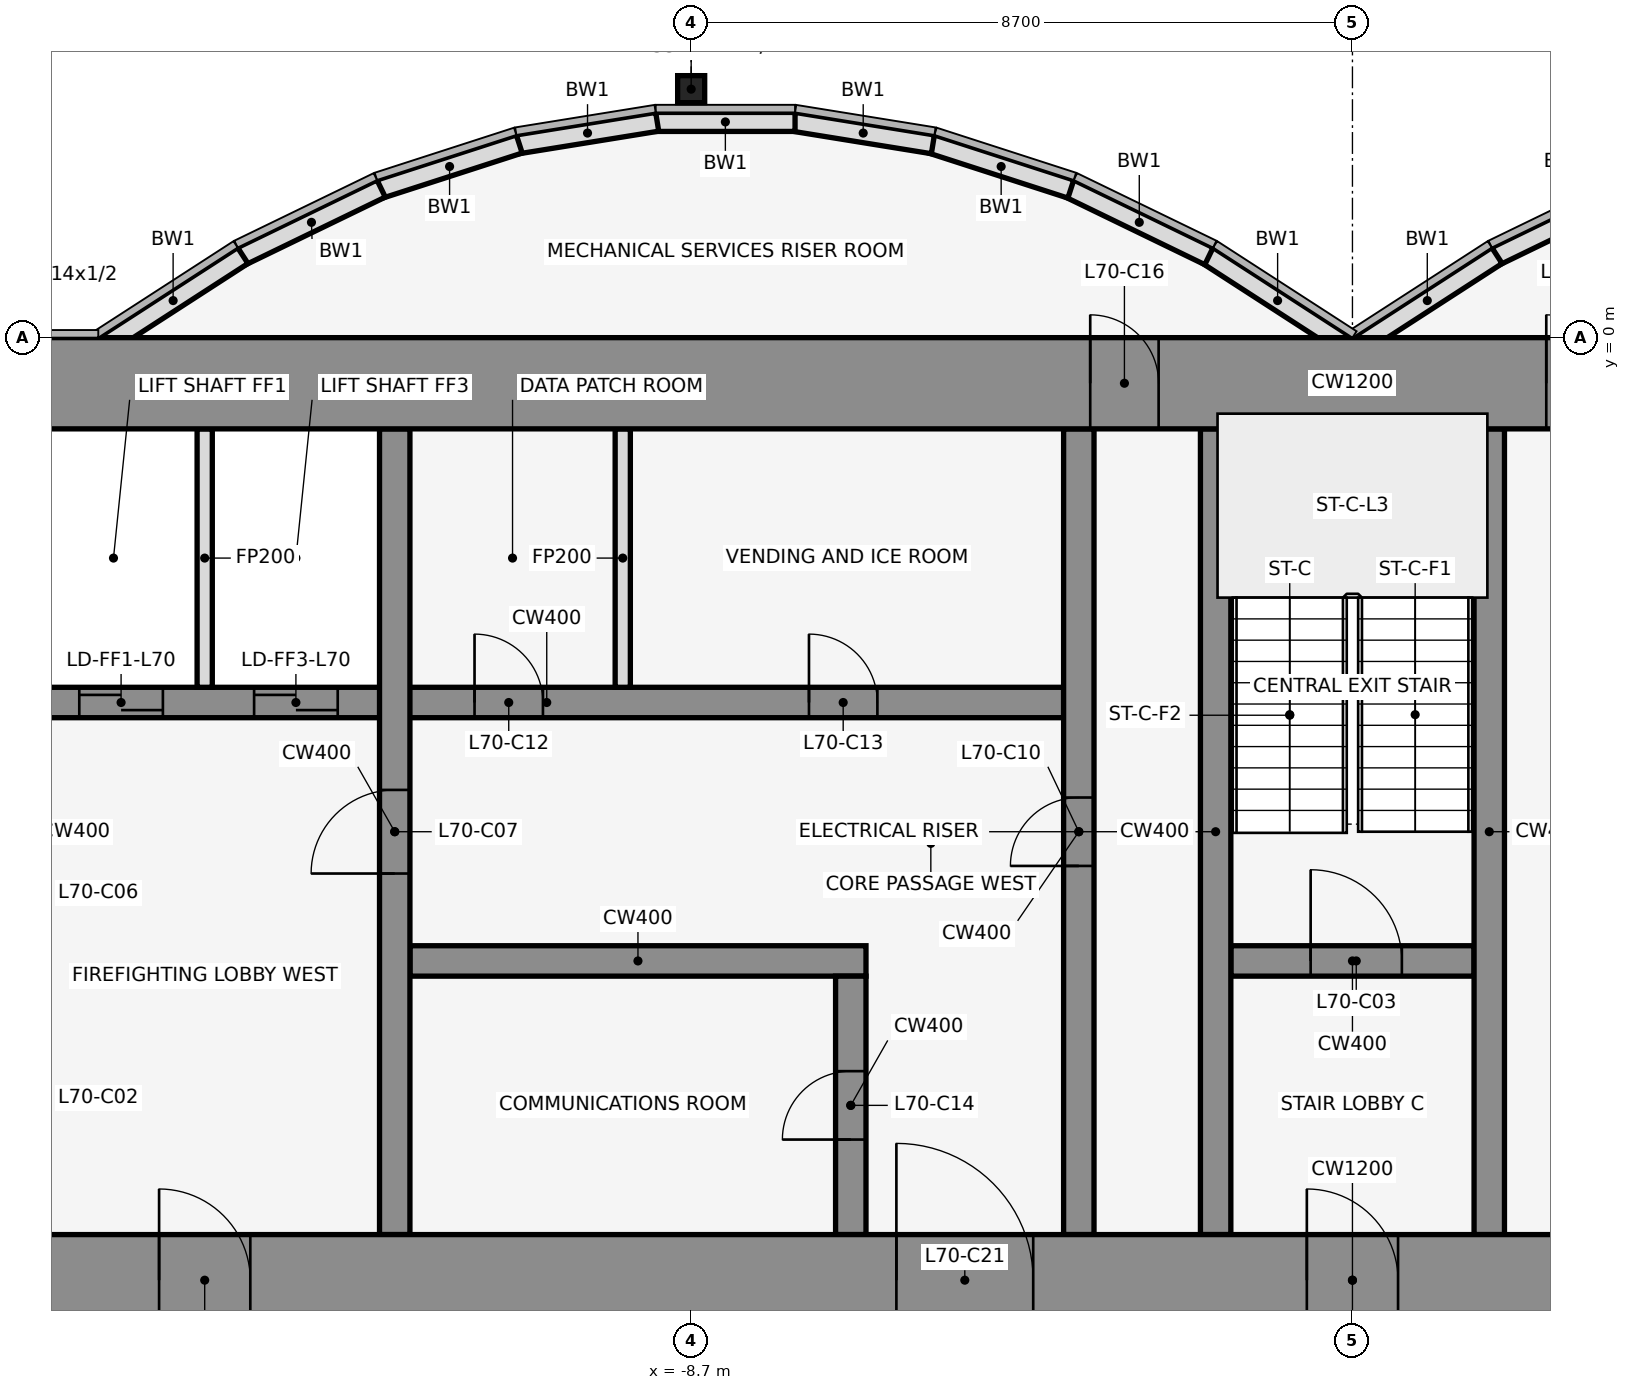
"""IFC4 building model, lengths in metres.
Left out: names, types, materials, properties, quantities, classifications, styles, units other than length and angle.
Written with IfcOpenShell. Run it as: python <this file> out.ifc"""

import sys

from ifc_helpers import new_model, si_unit, direction, frame, frame_2d, origin, origin_2d, place, context, subcontext, project, spatial, rectangle, hollow_rectangle, extrude, element, fill, save


model = new_model("IFC4")
c1 = context("Model", 3, precision=1e-05, world=origin(), true_north=direction((0.0, 1.0)))
c2 = subcontext(c1, "Body", "Model", "MODEL_VIEW")
j1 = project(units=[si_unit("LENGTHUNIT", "METRE"), si_unit("PLANEANGLEUNIT", "RADIAN")], contexts=[c1])
p1 = place(None, origin())
s1 = spatial("IfcSite", under=j1, at=p1, CompositionType="ELEMENT")
p2 = place(p1, origin())
s2 = spatial("IfcBuilding", under=s1, at=p2, CompositionType="ELEMENT")
p3 = place(p2, frame((0.0, 0.0, 311.0)))
s3 = spatial("IfcBuildingStorey", under=s2, at=p3, CompositionType="ELEMENT", Elevation=311.0)
p4 = place(p3, frame((-8.7, 3.269, 0.0), z_axis=(0.0, 0.0, 1.0), x_axis=(1.0, 0.0, 0.0)))
e1 = element("IfcColumn", 1, at=p4, inside=s3, PredefinedType="COLUMN", context=c2, shape_type="SweptSolid", body=[
    extrude(hollow_rectangle(XDim=0.356, YDim=0.356, WallThickness=0.012, at=origin_2d()), origin(), (0.0, 0.0, 1.0), 4.5),
])
p5 = place(p3, frame((3.721, 1.962, 0.0), z_axis=(0.0, 0.0, 1.0), x_axis=(-0.89982408427, -0.436252928206, 0.0)))
e2 = element("IfcWall", 2, at=p5, inside=s3, PredefinedType="STANDARD", context=c2, shape_type="SweptSolid", body=[
    extrude(rectangle(XDim=2.038, YDim=0.25, at=frame_2d((1.019, 0.0))), origin(), (0.0, 0.0, 1.0), 4.35),
])
for number, where, z_axis, x_axis in (
    (3, (1.901, 1.08, 0.0), (0.0, 0.0, 1.0), (-0.84, -0.543, 0.0)),
    (4, (-0.068, -0.105, 0.0), (0.0, 0.0, 1.0), (-0.84, 0.543, 0.0)),
):
    element("IfcWall", number, at=place(p3, frame(where, z_axis=z_axis, x_axis=x_axis)), inside=s3, PredefinedType="STANDARD", context=c2, shape_type="SweptSolid", body=[
        extrude(rectangle(XDim=2.183, YDim=0.25, at=frame_2d((1.091, 0.0))), origin(), (0.0, 0.0, 1.0), 4.35),
    ])
p6 = place(p3, frame((-1.888, 1.073, 0.0), z_axis=(0.0, 0.0, 1.0), x_axis=(-0.89982408427, 0.436252928206, 0.0)))
e5 = element("IfcWall", 5, at=p6, inside=s3, PredefinedType="STANDARD", context=c2, shape_type="SweptSolid", body=[
    extrude(rectangle(XDim=2.038, YDim=0.25, at=frame_2d((1.019, 0.0))), origin(), (0.0, 0.0, 1.0), 4.35),
])
p7 = place(p3, frame((-3.705, 1.955, 0.0), z_axis=(0.0, 0.0, 1.0), x_axis=(-0.951495806175, 0.307661714928, 0.0)))
e6 = element("IfcWall", 6, at=p7, inside=s3, PredefinedType="STANDARD", context=c2, shape_type="SweptSolid", body=[
    extrude(rectangle(XDim=1.927, YDim=0.25, at=frame_2d((0.963, 0.0))), origin(), (0.0, 0.0, 1.0), 4.35),
])
p8 = place(p3, frame((-5.52, 2.543, 0.0), z_axis=(0.0, 0.0, 1.0), x_axis=(-0.987181718931, 0.159600293885, 0.0)))
e7 = element("IfcWall", 7, at=p8, inside=s3, PredefinedType="STANDARD", context=c2, shape_type="SweptSolid", body=[
    extrude(rectangle(XDim=1.857, YDim=0.25, at=frame_2d((0.929, 0.0))), origin(), (0.0, 0.0, 1.0), 4.35),
])
p9 = place(p3, frame((-7.333, 2.838, 0.0), z_axis=(0.0, 0.0, 1.0), x_axis=(-1.0, 0.0, 0.0)))
e8 = element("IfcWall", 8, at=p9, inside=s3, PredefinedType="STANDARD", context=c2, shape_type="SweptSolid", body=[
    extrude(rectangle(XDim=1.833, YDim=0.25, at=frame_2d((0.917, 0.0))), origin(), (0.0, 0.0, 1.0), 4.35),
])
p10 = place(p3, frame((-9.147, 2.84, 0.0), z_axis=(0.0, 0.0, 1.0), x_axis=(-0.987181718931, -0.159600293885, 0.0)))
e9 = element("IfcWall", 9, at=p10, inside=s3, PredefinedType="STANDARD", context=c2, shape_type="SweptSolid", body=[
    extrude(rectangle(XDim=1.857, YDim=0.25, at=frame_2d((0.929, 0.0))), origin(), (0.0, 0.0, 1.0), 4.35),
])
p11 = place(p3, frame((-10.962, 2.548, 0.0), z_axis=(0.0, 0.0, 1.0), x_axis=(-0.951495806175, -0.307661714928, 0.0)))
e10 = element("IfcWall", 10, at=p11, inside=s3, PredefinedType="STANDARD", context=c2, shape_type="SweptSolid", body=[
    extrude(rectangle(XDim=1.927, YDim=0.25, at=frame_2d((0.963, 0.0))), origin(), (0.0, 0.0, 1.0), 4.35),
])
p12 = place(p3, frame((-12.779, 1.962, 0.0), z_axis=(0.0, 0.0, 1.0), x_axis=(-0.89982408427, -0.436252928206, 0.0)))
e11 = element("IfcWall", 11, at=p12, inside=s3, PredefinedType="STANDARD", context=c2, shape_type="SweptSolid", body=[
    extrude(rectangle(XDim=2.038, YDim=0.25, at=frame_2d((1.019, 0.0))), origin(), (0.0, 0.0, 1.0), 4.35),
])
p13 = place(p3, frame((-14.599, 1.08, 0.0), z_axis=(0.0, 0.0, 1.0), x_axis=(-0.83981312244, -0.542875602121, 0.0)))
e12 = element("IfcWall", 12, at=p13, inside=s3, PredefinedType="STANDARD", context=c2, shape_type="SweptSolid", body=[
    extrude(rectangle(XDim=2.183, YDim=0.25, at=frame_2d((1.091, 0.0))), origin(), (0.0, 0.0, 1.0), 4.35),
])
p14 = place(p3, frame((-12.4, -8.2, 0.0), z_axis=(0.0, 0.0, 1.0), x_axis=(1.0, 0.0, 0.0)))
e13 = element("IfcWall", 13, at=p14, inside=s3, PredefinedType="SHEAR", context=c2, shape_type="SweptSolid", body=[
    extrude(rectangle(XDim=6.0, YDim=0.4, at=frame_2d((3.0, 0.0))), origin(), (0.0, 0.0, 1.0), 4.5),
])
p15 = place(p3, frame((-1.6, -8.2, 0.0), z_axis=(0.0, 0.0, 1.0), x_axis=(1.0, 0.0, 0.0)))
e14 = element("IfcWall", 14, at=p15, inside=s3, PredefinedType="SHEAR", context=c2, shape_type="SweptSolid", body=[
    extrude(rectangle(XDim=3.2, YDim=0.4, at=frame_2d((1.6, 0.0))), origin(), (0.0, 0.0, 1.0), 4.5),
])
p16 = place(p15, frame((1.05, 0.0, 0.0)))
e15 = element("IfcOpeningElement", 15, at=p16, cuts=e14, PredefinedType="OPENING", context=c2, shape_type="SweptSolid", body=[
    extrude(rectangle(XDim=1.2, YDim=2.1, at=frame_2d((0.6, 1.05))), frame((0.0, 0.212, 0.0), z_axis=(0.0, -1.0, 0.0), x_axis=(1.0, 0.0, 0.0)), (0.0, 0.0, 1.0), 0.424),
])
p17 = place(p3, frame((-17.4, -4.8, 0.0), z_axis=(0.0, 0.0, 1.0), x_axis=(1.0, 0.0, 0.0)))
e16 = element("IfcWall", 16, at=p17, inside=s3, PredefinedType="SHEAR", context=c2, shape_type="SweptSolid", body=[
    extrude(rectangle(XDim=13.6, YDim=0.4, at=frame_2d((6.8, 0.0))), origin(), (0.0, 0.0, 1.0), 4.5),
])
p18 = place(p17, frame((0.65, 0.0, 0.0)))
e17 = element("IfcOpeningElement", 17, at=p18, cuts=e16, PredefinedType="OPENING", context=c2, shape_type="SweptSolid", body=[
    extrude(rectangle(XDim=1.1, YDim=2.1, at=frame_2d((0.55, 1.05))), frame((0.0, 0.212, 0.0), z_axis=(0.0, -1.0, 0.0), x_axis=(1.0, 0.0, 0.0)), (0.0, 0.0, 1.0), 0.424),
])
p19 = place(p17, frame((2.95, 0.0, 0.0)))
e18 = element("IfcOpeningElement", 18, at=p19, cuts=e16, PredefinedType="OPENING", context=c2, shape_type="SweptSolid", body=[
    extrude(rectangle(XDim=1.1, YDim=2.1, at=frame_2d((0.55, 1.05))), frame((0.0, 0.212, 0.0), z_axis=(0.0, -1.0, 0.0), x_axis=(1.0, 0.0, 0.0)), (0.0, 0.0, 1.0), 0.424),
])
p20 = place(p17, frame((5.85, 0.0, 0.0)))
e19 = element("IfcOpeningElement", 19, at=p20, cuts=e16, PredefinedType="OPENING", context=c2, shape_type="SweptSolid", body=[
    extrude(rectangle(XDim=0.9, YDim=2.1, at=frame_2d((0.45, 1.05))), frame((0.0, 0.212, 0.0), z_axis=(0.0, -1.0, 0.0), x_axis=(1.0, 0.0, 0.0)), (0.0, 0.0, 1.0), 0.424),
])
p21 = place(p17, frame((10.25, 0.0, 0.0)))
e20 = element("IfcOpeningElement", 20, at=p21, cuts=e16, PredefinedType="OPENING", context=c2, shape_type="SweptSolid", body=[
    extrude(rectangle(XDim=0.9, YDim=2.1, at=frame_2d((0.45, 1.05))), frame((0.0, 0.212, 0.0), z_axis=(0.0, -1.0, 0.0), x_axis=(1.0, 0.0, 0.0)), (0.0, 0.0, 1.0), 0.424),
])
p22 = place(p3, frame((-15.1, -4.6, 0.0), z_axis=(0.0, 0.0, 1.0), x_axis=(0.0, 1.0, 0.0)))
e21 = element("IfcWall", 21, at=p22, inside=s3, PredefinedType="PARTITIONING", context=c2, shape_type="SweptSolid", body=[
    extrude(rectangle(XDim=3.4, YDim=0.2, at=frame_2d((1.7, 0.0))), origin(), (0.0, 0.0, 1.0), 3.418),
])
p23 = place(p3, frame((-12.6, -11.8, 0.0), z_axis=(0.0, 0.0, 1.0), x_axis=(0.0, 1.0, 0.0)))
e22 = element("IfcWall", 22, at=p23, inside=s3, PredefinedType="SHEAR", context=c2, shape_type="SweptSolid", body=[
    extrude(rectangle(XDim=10.6, YDim=0.4, at=frame_2d((5.3, 0.0))), origin(), (0.0, 0.0, 1.0), 4.5),
])
p24 = place(p23, frame((4.75, 0.0, 0.0)))
e23 = element("IfcOpeningElement", 23, at=p24, cuts=e22, PredefinedType="OPENING", context=c2, shape_type="SweptSolid", body=[
    extrude(rectangle(XDim=1.1, YDim=2.1, at=frame_2d((0.55, 1.05))), frame((0.0, 0.212, 0.0), z_axis=(0.0, -1.0, 0.0), x_axis=(1.0, 0.0, 0.0)), (0.0, 0.0, 1.0), 0.424),
])
p25 = place(p3, frame((-9.6, -4.6, 0.0), z_axis=(0.0, 0.0, 1.0), x_axis=(0.0, 1.0, 0.0)))
e24 = element("IfcWall", 24, at=p25, inside=s3, PredefinedType="PARTITIONING", context=c2, shape_type="SweptSolid", body=[
    extrude(rectangle(XDim=3.4, YDim=0.2, at=frame_2d((1.7, 0.0))), origin(), (0.0, 0.0, 1.0), 3.418),
])
p26 = place(p3, frame((-6.6, -11.8, 0.0), z_axis=(0.0, 0.0, 1.0), x_axis=(0.0, 1.0, 0.0)))
e25 = element("IfcWall", 25, at=p26, inside=s3, PredefinedType="SHEAR", context=c2, shape_type="SweptSolid", body=[
    extrude(rectangle(XDim=3.4, YDim=0.4, at=frame_2d((1.7, 0.0))), origin(), (0.0, 0.0, 1.0), 4.5),
])
p27 = place(p26, frame((1.25, 0.0, 0.0)))
e26 = element("IfcOpeningElement", 26, at=p27, cuts=e25, PredefinedType="OPENING", context=c2, shape_type="SweptSolid", body=[
    extrude(rectangle(XDim=0.9, YDim=2.1, at=frame_2d((0.45, 1.05))), frame((0.0, 0.212, 0.0), z_axis=(0.0, -1.0, 0.0), x_axis=(1.0, 0.0, 0.0)), (0.0, 0.0, 1.0), 0.424),
])
p28 = place(p3, frame((-3.6, -11.8, 0.0), z_axis=(0.0, 0.0, 1.0), x_axis=(0.0, 1.0, 0.0)))
e27 = element("IfcWall", 27, at=p28, inside=s3, PredefinedType="SHEAR", context=c2, shape_type="SweptSolid", body=[
    extrude(rectangle(XDim=10.6, YDim=0.4, at=frame_2d((5.3, 0.0))), origin(), (0.0, 0.0, 1.0), 4.5),
])
p29 = place(p28, frame((4.85, 0.0, 0.0)))
e28 = element("IfcOpeningElement", 28, at=p29, cuts=e27, PredefinedType="OPENING", context=c2, shape_type="SweptSolid", body=[
    extrude(rectangle(XDim=0.9, YDim=2.1, at=frame_2d((0.45, 1.05))), frame((0.0, 0.212, 0.0), z_axis=(0.0, -1.0, 0.0), x_axis=(1.0, 0.0, 0.0)), (0.0, 0.0, 1.0), 0.424),
])
for number, where, z_axis, x_axis in (
    (29, (-1.8, -11.8, 0.0), (0.0, 0.0, 1.0), (0.0, 1.0, 0.0)),
    (30, (1.8, -11.8, 0.0), (0.0, 0.0, 1.0), (0.0, 1.0, 0.0)),
):
    element("IfcWall", number, at=place(p3, frame(where, z_axis=z_axis, x_axis=x_axis)), inside=s3, PredefinedType="SHEAR", context=c2, shape_type="SweptSolid", body=[
        extrude(rectangle(XDim=10.6, YDim=0.4, at=frame_2d((5.3, 0.0))), origin(), (0.0, 0.0, 1.0), 4.5),
    ])
p30 = place(p3, frame((-22.0, -0.6, 0.0), z_axis=(0.0, 0.0, 1.0), x_axis=(1.0, 0.0, 0.0)))
e31 = element("IfcWall", 31, at=p30, inside=s3, PredefinedType="SHEAR", context=c2, shape_type="SweptSolid", body=[
    extrude(rectangle(XDim=44.0, YDim=1.2, at=frame_2d((22.0, 0.0))), origin(), (0.0, 0.0, 1.0), 4.5),
])
p31 = place(p30, frame((18.55, 0.0, 0.0)))
e32 = element("IfcOpeningElement", 32, at=p31, cuts=e31, PredefinedType="OPENING", context=c2, shape_type="SweptSolid", body=[
    extrude(rectangle(XDim=0.9, YDim=2.1, at=frame_2d((0.45, 1.05))), frame((0.0, 0.612, 0.0), z_axis=(0.0, -1.0, 0.0), x_axis=(1.0, 0.0, 0.0)), (0.0, 0.0, 1.0), 1.224),
])
p32 = place(p30, frame((24.55, 0.0, 0.0)))
e33 = element("IfcOpeningElement", 33, at=p32, cuts=e31, PredefinedType="OPENING", context=c2, shape_type="SweptSolid", body=[
    extrude(rectangle(XDim=0.9, YDim=2.1, at=frame_2d((0.45, 1.05))), frame((0.0, 0.612, 0.0), z_axis=(0.0, -1.0, 0.0), x_axis=(1.0, 0.0, 0.0)), (0.0, 0.0, 1.0), 1.224),
])
p33 = place(p3, frame((-22.0, -12.4, 0.0), z_axis=(0.0, 0.0, 1.0), x_axis=(1.0, 0.0, 0.0)))
e34 = element("IfcWall", 34, at=p33, inside=s3, PredefinedType="SHEAR", context=c2, shape_type="SweptSolid", body=[
    extrude(rectangle(XDim=44.0, YDim=1.2, at=frame_2d((22.0, 0.0))), origin(), (0.0, 0.0, 1.0), 4.5),
])
p34 = place(p33, frame((2.2, 0.0, 0.0)))
e35 = element("IfcOpeningElement", 35, at=p34, cuts=e34, PredefinedType="OPENING", context=c2, shape_type="SweptSolid", body=[
    extrude(rectangle(XDim=1.2, YDim=2.1, at=frame_2d((0.6, 1.05))), frame((0.0, 0.612, 0.0), z_axis=(0.0, -1.0, 0.0), x_axis=(1.0, 0.0, 0.0)), (0.0, 0.0, 1.0), 1.224),
])
p35 = place(p33, frame((21.4, 0.0, 0.0)))
e36 = element("IfcOpeningElement", 36, at=p35, cuts=e34, PredefinedType="OPENING", context=c2, shape_type="SweptSolid", body=[
    extrude(rectangle(XDim=1.2, YDim=2.1, at=frame_2d((0.6, 1.05))), frame((0.0, 0.612, 0.0), z_axis=(0.0, -1.0, 0.0), x_axis=(1.0, 0.0, 0.0)), (0.0, 0.0, 1.0), 1.224),
])
p36 = place(p33, frame((40.6, 0.0, 0.0)))
e37 = element("IfcOpeningElement", 37, at=p36, cuts=e34, PredefinedType="OPENING", context=c2, shape_type="SweptSolid", body=[
    extrude(rectangle(XDim=1.2, YDim=2.1, at=frame_2d((0.6, 1.05))), frame((0.0, 0.612, 0.0), z_axis=(0.0, -1.0, 0.0), x_axis=(1.0, 0.0, 0.0)), (0.0, 0.0, 1.0), 1.224),
])
p37 = place(p33, frame((16.0, 0.0, 0.0)))
e38 = element("IfcOpeningElement", 38, at=p37, cuts=e34, PredefinedType="OPENING", context=c2, shape_type="SweptSolid", body=[
    extrude(rectangle(XDim=1.8, YDim=2.1, at=frame_2d((0.9, 1.05))), frame((0.0, 0.612, 0.0), z_axis=(0.0, -1.0, 0.0), x_axis=(1.0, 0.0, 0.0)), (0.0, 0.0, 1.0), 1.224),
])
p38 = place(p33, frame((6.3, 0.0, 0.0)))
e39 = element("IfcOpeningElement", 39, at=p38, cuts=e34, PredefinedType="OPENING", context=c2, shape_type="SweptSolid", body=[
    extrude(rectangle(XDim=1.2, YDim=2.1, at=frame_2d((0.6, 1.05))), frame((0.0, 0.612, 0.0), z_axis=(0.0, -1.0, 0.0), x_axis=(1.0, 0.0, 0.0)), (0.0, 0.0, 1.0), 1.224),
])
p39 = place(p33, frame((26.2, 0.0, 0.0)))
e40 = element("IfcOpeningElement", 40, at=p39, cuts=e34, PredefinedType="OPENING", context=c2, shape_type="SweptSolid", body=[
    extrude(rectangle(XDim=1.8, YDim=2.1, at=frame_2d((0.9, 1.05))), frame((0.0, 0.612, 0.0), z_axis=(0.0, -1.0, 0.0), x_axis=(1.0, 0.0, 0.0)), (0.0, 0.0, 1.0), 1.224),
])
p40 = place(p33, frame((36.5, 0.0, 0.0)))
e41 = element("IfcOpeningElement", 41, at=p40, cuts=e34, PredefinedType="OPENING", context=c2, shape_type="SweptSolid", body=[
    extrude(rectangle(XDim=1.2, YDim=2.1, at=frame_2d((0.6, 1.05))), frame((0.0, 0.612, 0.0), z_axis=(0.0, -1.0, 0.0), x_axis=(1.0, 0.0, 0.0)), (0.0, 0.0, 1.0), 1.224),
])
p41 = place(p16, origin())
e42 = element("IfcDoor", 42, at=p41, inside=s3, OperationType="SINGLE_SWING_LEFT", PredefinedType="DOOR", context=c2, shape_type="SweptSolid", body=[
    extrude(rectangle(XDim=1.2, YDim=2.1, at=frame_2d((0.6, 1.05))), frame((0.0, 0.025, 0.0), z_axis=(0.0, -1.0, 0.0), x_axis=(1.0, 0.0, 0.0)), (0.0, 0.0, 1.0), 0.05),
])
fill(e15, e42)
p42 = place(p18, origin())
e43 = element("IfcDoor", 43, at=p42, inside=s3, OperationType="DOUBLE_DOOR_SLIDING", PredefinedType="DOOR", context=c2, shape_type="SweptSolid", body=[
    extrude(rectangle(XDim=1.1, YDim=2.1, at=frame_2d((0.55, 1.05))), frame((0.0, 0.025, 0.0), z_axis=(0.0, -1.0, 0.0), x_axis=(1.0, 0.0, 0.0)), (0.0, 0.0, 1.0), 0.05),
])
fill(e17, e43)
p43 = place(p19, origin())
e44 = element("IfcDoor", 44, at=p43, inside=s3, OperationType="DOUBLE_DOOR_SLIDING", PredefinedType="DOOR", context=c2, shape_type="SweptSolid", body=[
    extrude(rectangle(XDim=1.1, YDim=2.1, at=frame_2d((0.55, 1.05))), frame((0.0, 0.025, 0.0), z_axis=(0.0, -1.0, 0.0), x_axis=(1.0, 0.0, 0.0)), (0.0, 0.0, 1.0), 0.05),
])
fill(e18, e44)
p44 = place(p24, origin())
e45 = element("IfcDoor", 45, at=p44, inside=s3, OperationType="SINGLE_SWING_LEFT", PredefinedType="DOOR", context=c2, shape_type="SweptSolid", body=[
    extrude(rectangle(XDim=1.1, YDim=2.1, at=frame_2d((0.55, 1.05))), frame((0.0, 0.025, 0.0), z_axis=(0.0, -1.0, 0.0), x_axis=(1.0, 0.0, 0.0)), (0.0, 0.0, 1.0), 0.05),
])
fill(e23, e45)
p45 = place(p29, frame((0.9, 0.0, 0.0), z_axis=(0.0, 0.0, 1.0), x_axis=(-1.0, 0.0, 0.0)))
e46 = element("IfcDoor", 46, at=p45, inside=s3, OperationType="SINGLE_SWING_LEFT", PredefinedType="DOOR", context=c2, shape_type="SweptSolid", body=[
    extrude(rectangle(XDim=0.9, YDim=2.1, at=frame_2d((0.45, 1.05))), frame((0.0, 0.025, 0.0), z_axis=(0.0, -1.0, 0.0), x_axis=(1.0, 0.0, 0.0)), (0.0, 0.0, 1.0), 0.05),
])
fill(e28, e46)
p46 = place(p20, origin())
e47 = element("IfcDoor", 47, at=p46, inside=s3, OperationType="SINGLE_SWING_RIGHT", PredefinedType="DOOR", context=c2, shape_type="SweptSolid", body=[
    extrude(rectangle(XDim=0.9, YDim=2.1, at=frame_2d((0.45, 1.05))), frame((0.0, 0.025, 0.0), z_axis=(0.0, -1.0, 0.0), x_axis=(1.0, 0.0, 0.0)), (0.0, 0.0, 1.0), 0.05),
])
fill(e19, e47)
p47 = place(p21, origin())
e48 = element("IfcDoor", 48, at=p47, inside=s3, OperationType="SINGLE_SWING_LEFT", PredefinedType="DOOR", context=c2, shape_type="SweptSolid", body=[
    extrude(rectangle(XDim=0.9, YDim=2.1, at=frame_2d((0.45, 1.05))), frame((0.0, 0.025, 0.0), z_axis=(0.0, -1.0, 0.0), x_axis=(1.0, 0.0, 0.0)), (0.0, 0.0, 1.0), 0.05),
])
fill(e20, e48)
p48 = place(p27, origin())
e49 = element("IfcDoor", 49, at=p48, inside=s3, OperationType="SINGLE_SWING_RIGHT", PredefinedType="DOOR", context=c2, shape_type="SweptSolid", body=[
    extrude(rectangle(XDim=0.9, YDim=2.1, at=frame_2d((0.45, 1.05))), frame((0.0, 0.025, 0.0), z_axis=(0.0, -1.0, 0.0), x_axis=(1.0, 0.0, 0.0)), (0.0, 0.0, 1.0), 0.05),
])
fill(e26, e49)
p49 = place(p31, origin())
e50 = element("IfcDoor", 50, at=p49, inside=s3, OperationType="SINGLE_SWING_LEFT", PredefinedType="DOOR", context=c2, shape_type="SweptSolid", body=[
    extrude(rectangle(XDim=0.9, YDim=2.1, at=frame_2d((0.45, 1.05))), frame((0.0, 0.025, 0.0), z_axis=(0.0, -1.0, 0.0), x_axis=(1.0, 0.0, 0.0)), (0.0, 0.0, 1.0), 0.05),
])
fill(e32, e50)
p50 = place(p32, origin())
e51 = element("IfcDoor", 51, at=p50, inside=s3, OperationType="SINGLE_SWING_LEFT", PredefinedType="DOOR", context=c2, shape_type="SweptSolid", body=[
    extrude(rectangle(XDim=0.9, YDim=2.1, at=frame_2d((0.45, 1.05))), frame((0.0, 0.025, 0.0), z_axis=(0.0, -1.0, 0.0), x_axis=(1.0, 0.0, 0.0)), (0.0, 0.0, 1.0), 0.05),
])
fill(e33, e51)
p51 = place(p35, frame((1.2, 0.0, 0.0), z_axis=(0.0, 0.0, 1.0), x_axis=(-1.0, 0.0, 0.0)))
e52 = element("IfcDoor", 52, at=p51, inside=s3, OperationType="SINGLE_SWING_RIGHT", PredefinedType="DOOR", context=c2, shape_type="SweptSolid", body=[
    extrude(rectangle(XDim=1.2, YDim=2.1, at=frame_2d((0.6, 1.05))), frame((0.0, 0.025, 0.0), z_axis=(0.0, -1.0, 0.0), x_axis=(1.0, 0.0, 0.0)), (0.0, 0.0, 1.0), 0.05),
])
fill(e36, e52)
p52 = place(p37, origin())
e53 = element("IfcDoor", 53, at=p52, inside=s3, OperationType="SINGLE_SWING_LEFT", PredefinedType="DOOR", context=c2, shape_type="SweptSolid", body=[
    extrude(rectangle(XDim=1.8, YDim=2.1, at=frame_2d((0.9, 1.05))), frame((0.0, 0.025, 0.0), z_axis=(0.0, -1.0, 0.0), x_axis=(1.0, 0.0, 0.0)), (0.0, 0.0, 1.0), 0.05),
])
fill(e38, e53)
p53 = place(p38, frame((1.2, 0.0, 0.0), z_axis=(0.0, 0.0, 1.0), x_axis=(-1.0, 0.0, 0.0)))
e54 = element("IfcDoor", 54, at=p53, inside=s3, OperationType="SINGLE_SWING_RIGHT", PredefinedType="DOOR", context=c2, shape_type="SweptSolid", body=[
    extrude(rectangle(XDim=1.2, YDim=2.1, at=frame_2d((0.6, 1.05))), frame((0.0, 0.025, 0.0), z_axis=(0.0, -1.0, 0.0), x_axis=(1.0, 0.0, 0.0)), (0.0, 0.0, 1.0), 0.05),
])
fill(e39, e54)
save(model, sys.argv[1])
